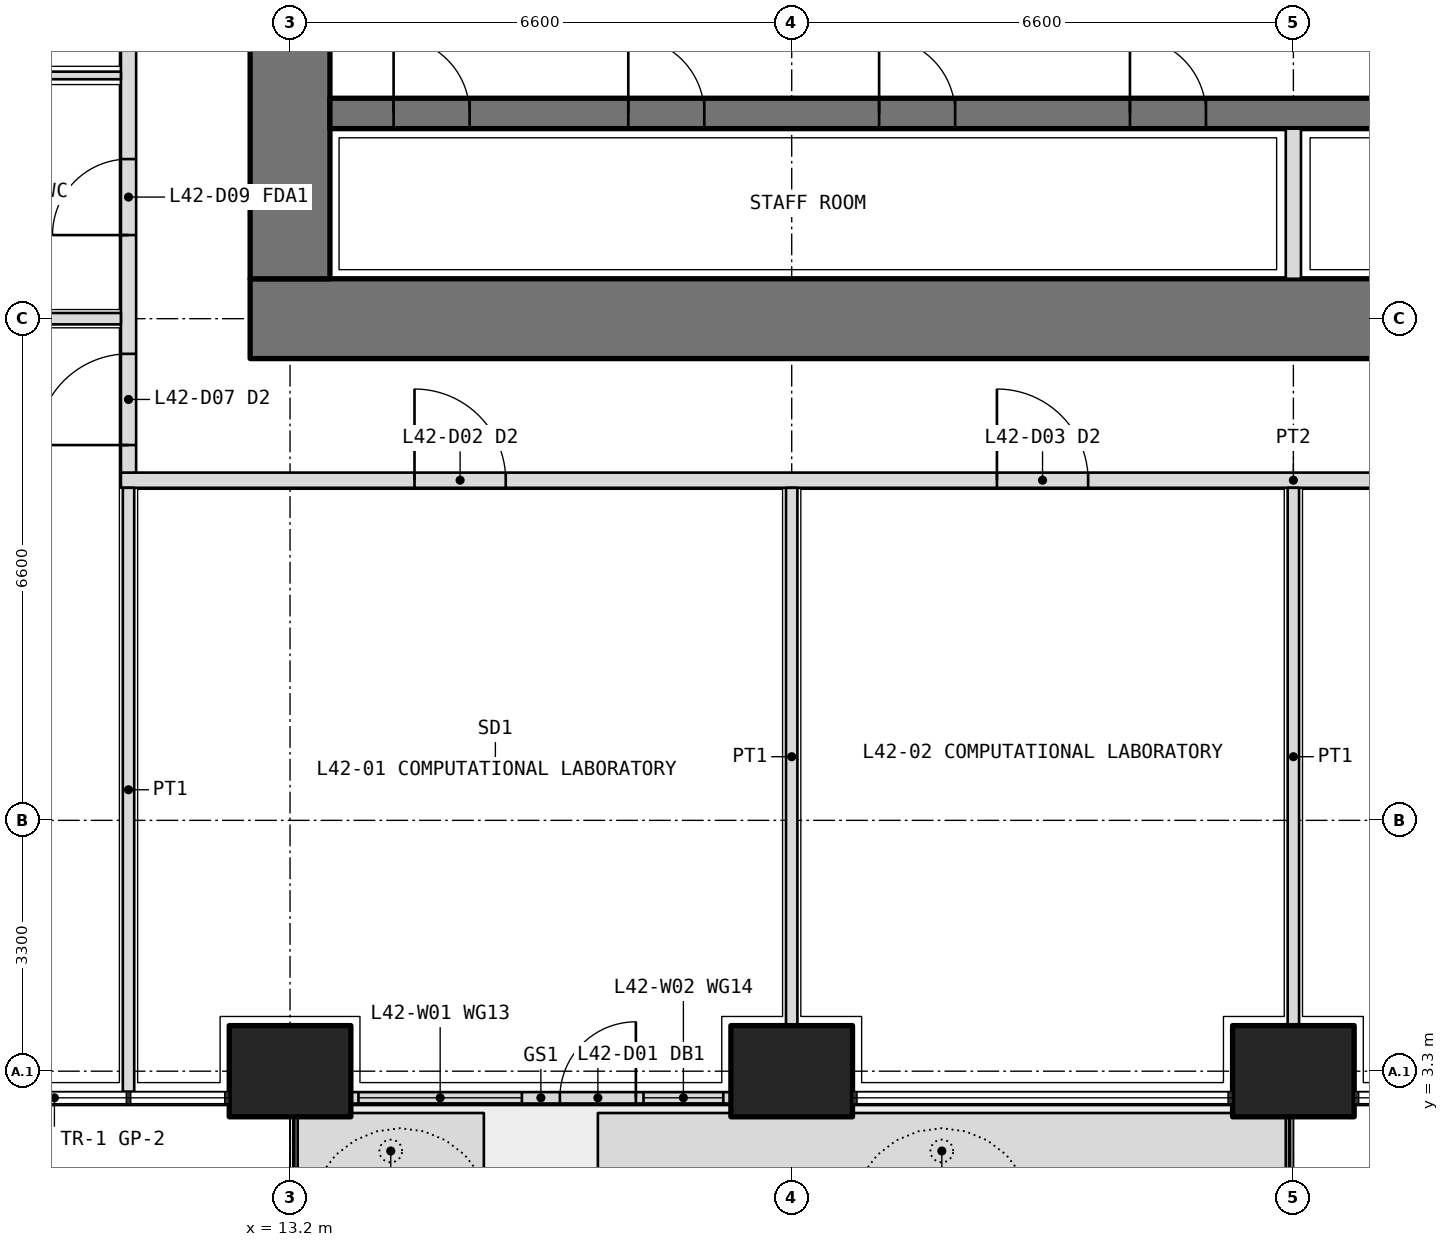
"""IFC4 building model, lengths in metres.
Left out: names, types, materials, properties, quantities, classifications, styles, units other than length and angle.
Written with IfcOpenShell. Run it as: python <this file> out.ifc"""

import sys

from ifc_helpers import new_model, si_unit, direction, frame, frame_2d, origin, origin_2d, place, context, subcontext, project, spatial, polyline, rectangle, outline, extrude, element, fill, save


model = new_model("IFC4")
c1 = context("Model", 3, precision=1e-05, world=origin(), true_north=direction((0.0, 1.0)))
c2 = subcontext(c1, "Body", "Model", "MODEL_VIEW")
j1 = project(units=[si_unit("LENGTHUNIT", "METRE"), si_unit("PLANEANGLEUNIT", "RADIAN")], contexts=[c1])
p1 = place(None, origin())
s1 = spatial("IfcSite", under=j1, at=p1, CompositionType="ELEMENT")
p2 = place(p1, origin())
s2 = spatial("IfcBuilding", under=s1, at=p2, CompositionType="ELEMENT")
p3 = place(p2, frame((0.0, 0.0, 185.1)))
s3 = spatial("IfcBuildingStorey", under=s2, at=p3, CompositionType="ELEMENT", Elevation=185.1)
for number, where, z_axis, x_axis in (
    (1, (13.2, 3.3, 0.0), (0.0, 0.0, 1.0), (1.0, 0.0, 0.0)),
    (2, (19.8, 3.3, 0.0), (0.0, 0.0, 1.0), (1.0, 0.0, 0.0)),
    (3, (26.4, 3.3, 0.0), (0.0, 0.0, 1.0), (1.0, 0.0, 0.0)),
):
    element("IfcColumn", number, at=place(p3, frame(where, z_axis=z_axis, x_axis=x_axis)), inside=s3, PredefinedType="COLUMN", context=c2, shape_type="SweptSolid", body=[
        extrude(rectangle(XDim=1.6, YDim=1.2, at=origin_2d()), origin(), (0.0, 0.0, 1.0), 4.2),
    ])
p4 = place(p3, origin())
e4 = element("IfcWall", 4, at=p4, inside=s3, PredefinedType="USERDEFINED", context=c2, shape_type="SweptSolid", body=[
    extrude(outline(polyline([(13.3, 1.75), (15.75, 1.75), (15.75, 2.75), (13.3, 2.75), (13.3, 1.75)]), holes=[polyline([(13.45, 1.9), (15.6, 1.9), (15.6, 2.6), (13.45, 2.6), (13.45, 1.9)])]), origin(), (0.0, 0.0, 1.0), 1.05),
])
p5 = place(p3, origin())
e5 = element("IfcWall", 5, at=p5, inside=s3, PredefinedType="USERDEFINED", context=c2, shape_type="SweptSolid", body=[
    extrude(outline(polyline([(17.25, 1.75), (26.3, 1.75), (26.3, 2.75), (17.25, 2.75), (17.25, 1.75)]), holes=[polyline([(17.4, 1.9), (26.15, 1.9), (26.15, 2.6), (17.4, 2.6), (17.4, 1.9)])]), origin(), (0.0, 0.0, 1.0), 1.05),
])
p6 = place(p3, frame((14.0, 2.95, 0.0), z_axis=(0.0, 0.0, 1.0), x_axis=(1.0, 0.0, 0.0)))
e6 = element("IfcWall", 6, at=p6, inside=s3, PredefinedType="SOLIDWALL", context=c2, shape_type="SweptSolid", body=[
    extrude(rectangle(XDim=5.0, YDim=0.15, at=frame_2d((2.5, 0.0))), origin(), (0.0, 0.0, 1.0), 2.7),
])
p7 = place(p6, frame((2.75, 0.0, 0.0)))
e7 = element("IfcOpeningElement", 7, at=p7, cuts=e6, PredefinedType="OPENING", context=c2, shape_type="SweptSolid", body=[
    extrude(rectangle(XDim=1.0, YDim=2.4, at=frame_2d((0.5, 1.2))), frame((0.0, 0.085, 0.0), z_axis=(0.0, -1.0, 0.0), x_axis=(1.0, 0.0, 0.0)), (0.0, 0.0, 1.0), 0.17),
])
p8 = place(p6, frame((0.1, 0.0, 0.1)))
e8 = element("IfcOpeningElement", 8, at=p8, cuts=e6, PredefinedType="OPENING", context=c2, shape_type="SweptSolid", body=[
    extrude(rectangle(XDim=2.15, YDim=2.3, at=frame_2d((1.075, 1.15))), frame((0.0, 0.085, 0.0), z_axis=(0.0, -1.0, 0.0), x_axis=(1.0, 0.0, 0.0)), (0.0, 0.0, 1.0), 0.17),
])
p9 = place(p6, frame((3.85, 0.0, 0.1)))
e9 = element("IfcOpeningElement", 9, at=p9, cuts=e6, PredefinedType="OPENING", context=c2, shape_type="SweptSolid", body=[
    extrude(rectangle(XDim=1.05, YDim=2.3, at=frame_2d((0.525, 1.15))), frame((0.0, 0.085, 0.0), z_axis=(0.0, -1.0, 0.0), x_axis=(1.0, 0.0, 0.0)), (0.0, 0.0, 1.0), 0.17),
])
p10 = place(p3, frame((12.675, 13.2, 0.0), z_axis=(0.0, 0.0, 1.0), x_axis=(1.0, 0.0, 0.0)))
e10 = element("IfcWall", 10, at=p10, inside=s3, PredefinedType="SHEAR", context=c2, shape_type="SweptSolid", body=[
    extrude(rectangle(XDim=27.45, YDim=1.05, at=frame_2d((13.725, 0.0))), origin(), (0.0, 0.0, 1.0), 4.2),
])
p11 = place(p3, frame((13.2, 32.475, 0.0), z_axis=(0.0, 0.0, 1.0), x_axis=(0.0, -1.0, 0.0)))
e11 = element("IfcWall", 11, at=p11, inside=s3, PredefinedType="SHEAR", context=c2, shape_type="SweptSolid", body=[
    extrude(rectangle(XDim=18.75, YDim=1.05, at=frame_2d((9.375, 0.0))), origin(), (0.0, 0.0, 1.0), 4.2),
])
p12 = place(p11, frame((14.125, 0.0, 0.0)))
e12 = element("IfcOpeningElement", 12, at=p12, cuts=e11, PredefinedType="OPENING", context=c2, shape_type="SweptSolid", body=[
    extrude(rectangle(XDim=1.6, YDim=2.1, at=frame_2d((0.8, 1.05))), frame((0.0, 0.535, 0.0), z_axis=(0.0, -1.0, 0.0), x_axis=(1.0, 0.0, 0.0)), (0.0, 0.0, 1.0), 1.07),
])
p13 = place(p11, frame((3.325, 0.0, 0.0)))
e13 = element("IfcOpeningElement", 13, at=p13, cuts=e11, PredefinedType="OPENING", context=c2, shape_type="SweptSolid", body=[
    extrude(rectangle(XDim=1.6, YDim=2.1, at=frame_2d((0.8, 1.05))), frame((0.0, 0.535, 0.0), z_axis=(0.0, -1.0, 0.0), x_axis=(1.0, 0.0, 0.0)), (0.0, 0.0, 1.0), 1.07),
])
p14 = place(p3, frame((13.725, 15.9, 0.0), z_axis=(0.0, 0.0, 1.0), x_axis=(1.0, 0.0, 0.0)))
e14 = element("IfcWall", 14, at=p14, inside=s3, PredefinedType="SHEAR", context=c2, shape_type="SweptSolid", body=[
    extrude(rectangle(XDim=25.35, YDim=0.4, at=frame_2d((12.675, 0.0))), origin(), (0.0, 0.0, 1.0), 4.2),
])
p15 = place(p14, frame((0.837, 0.0, 0.0)))
e15 = element("IfcOpeningElement", 15, at=p15, cuts=e14, PredefinedType="OPENING", context=c2, shape_type="SweptSolid", body=[
    extrude(rectangle(XDim=1.0, YDim=2.1, at=frame_2d((0.5, 1.05))), frame((0.0, 0.21, 0.0), z_axis=(0.0, -1.0, 0.0), x_axis=(1.0, 0.0, 0.0)), (0.0, 0.0, 1.0), 0.42),
])
p16 = place(p14, frame((3.925, 0.0, 0.0)))
e16 = element("IfcOpeningElement", 16, at=p16, cuts=e14, PredefinedType="OPENING", context=c2, shape_type="SweptSolid", body=[
    extrude(rectangle(XDim=1.0, YDim=2.1, at=frame_2d((0.5, 1.05))), frame((0.0, 0.21, 0.0), z_axis=(0.0, -1.0, 0.0), x_axis=(1.0, 0.0, 0.0)), (0.0, 0.0, 1.0), 0.42),
])
p17 = place(p14, frame((7.225, 0.0, 0.0)))
e17 = element("IfcOpeningElement", 17, at=p17, cuts=e14, PredefinedType="OPENING", context=c2, shape_type="SweptSolid", body=[
    extrude(rectangle(XDim=1.0, YDim=2.1, at=frame_2d((0.5, 1.05))), frame((0.0, 0.21, 0.0), z_axis=(0.0, -1.0, 0.0), x_axis=(1.0, 0.0, 0.0)), (0.0, 0.0, 1.0), 0.42),
])
p18 = place(p14, frame((10.525, 0.0, 0.0)))
e18 = element("IfcOpeningElement", 18, at=p18, cuts=e14, PredefinedType="OPENING", context=c2, shape_type="SweptSolid", body=[
    extrude(rectangle(XDim=1.0, YDim=2.1, at=frame_2d((0.5, 1.05))), frame((0.0, 0.21, 0.0), z_axis=(0.0, -1.0, 0.0), x_axis=(1.0, 0.0, 0.0)), (0.0, 0.0, 1.0), 0.42),
])
p19 = place(p14, frame((13.825, 0.0, 0.0)))
e19 = element("IfcOpeningElement", 19, at=p19, cuts=e14, PredefinedType="OPENING", context=c2, shape_type="SweptSolid", body=[
    extrude(rectangle(XDim=1.0, YDim=2.1, at=frame_2d((0.5, 1.05))), frame((0.0, 0.21, 0.0), z_axis=(0.0, -1.0, 0.0), x_axis=(1.0, 0.0, 0.0)), (0.0, 0.0, 1.0), 0.42),
])
p20 = place(p14, frame((17.125, 0.0, 0.0)))
e20 = element("IfcOpeningElement", 20, at=p20, cuts=e14, PredefinedType="OPENING", context=c2, shape_type="SweptSolid", body=[
    extrude(rectangle(XDim=1.0, YDim=2.1, at=frame_2d((0.5, 1.05))), frame((0.0, 0.21, 0.0), z_axis=(0.0, -1.0, 0.0), x_axis=(1.0, 0.0, 0.0)), (0.0, 0.0, 1.0), 0.42),
])
p21 = place(p14, frame((20.425, 0.0, 0.0)))
e21 = element("IfcOpeningElement", 21, at=p21, cuts=e14, PredefinedType="OPENING", context=c2, shape_type="SweptSolid", body=[
    extrude(rectangle(XDim=1.0, YDim=2.1, at=frame_2d((0.5, 1.05))), frame((0.0, 0.21, 0.0), z_axis=(0.0, -1.0, 0.0), x_axis=(1.0, 0.0, 0.0)), (0.0, 0.0, 1.0), 0.42),
])
p22 = place(p14, frame((23.512, 0.0, 0.0)))
e22 = element("IfcOpeningElement", 22, at=p22, cuts=e14, PredefinedType="OPENING", context=c2, shape_type="SweptSolid", body=[
    extrude(rectangle(XDim=1.0, YDim=2.1, at=frame_2d((0.5, 1.05))), frame((0.0, 0.21, 0.0), z_axis=(0.0, -1.0, 0.0), x_axis=(1.0, 0.0, 0.0)), (0.0, 0.0, 1.0), 0.42),
])
p23 = place(p3, frame((26.4, 13.725, 0.0), z_axis=(0.0, 0.0, 1.0), x_axis=(0.0, 1.0, 0.0)))
e23 = element("IfcWall", 23, at=p23, inside=s3, PredefinedType="PARTITIONING", context=c2, shape_type="SweptSolid", body=[
    extrude(rectangle(XDim=1.975, YDim=0.2, at=frame_2d((0.987, 0.0))), origin(), (0.0, 0.0, 1.0), 4.2),
])
p24 = place(p3, frame((10.975, 11.075, 0.0), z_axis=(0.0, 0.0, 1.0), x_axis=(1.0, 0.0, 0.0)))
e24 = element("IfcWall", 24, at=p24, inside=s3, PredefinedType="PARTITIONING", context=c2, shape_type="SweptSolid", body=[
    extrude(rectangle(XDim=30.85, YDim=0.2, at=frame_2d((15.425, 0.0))), origin(), (0.0, 0.0, 1.0), 2.85),
])
p25 = place(p24, frame((3.863, 0.0, 0.0)))
e25 = element("IfcOpeningElement", 25, at=p25, cuts=e24, PredefinedType="OPENING", context=c2, shape_type="SweptSolid", body=[
    extrude(rectangle(XDim=1.2, YDim=2.1, at=frame_2d((0.6, 1.05))), frame((0.0, 0.11, 0.0), z_axis=(0.0, -1.0, 0.0), x_axis=(1.0, 0.0, 0.0)), (0.0, 0.0, 1.0), 0.22),
])
p26 = place(p24, frame((11.525, 0.0, 0.0)))
e26 = element("IfcOpeningElement", 26, at=p26, cuts=e24, PredefinedType="OPENING", context=c2, shape_type="SweptSolid", body=[
    extrude(rectangle(XDim=1.2, YDim=2.1, at=frame_2d((0.6, 1.05))), frame((0.0, 0.11, 0.0), z_axis=(0.0, -1.0, 0.0), x_axis=(1.0, 0.0, 0.0)), (0.0, 0.0, 1.0), 0.22),
])
p27 = place(p24, frame((18.125, 0.0, 0.0)))
e27 = element("IfcOpeningElement", 27, at=p27, cuts=e24, PredefinedType="OPENING", context=c2, shape_type="SweptSolid", body=[
    extrude(rectangle(XDim=1.2, YDim=2.1, at=frame_2d((0.6, 1.05))), frame((0.0, 0.11, 0.0), z_axis=(0.0, -1.0, 0.0), x_axis=(1.0, 0.0, 0.0)), (0.0, 0.0, 1.0), 0.22),
])
p28 = place(p24, frame((23.075, 0.0, 0.0)))
e28 = element("IfcOpeningElement", 28, at=p28, cuts=e24, PredefinedType="OPENING", context=c2, shape_type="SweptSolid", body=[
    extrude(rectangle(XDim=1.2, YDim=2.1, at=frame_2d((0.6, 1.05))), frame((0.0, 0.11, 0.0), z_axis=(0.0, -1.0, 0.0), x_axis=(1.0, 0.0, 0.0)), (0.0, 0.0, 1.0), 0.22),
])
p29 = place(p24, frame((27.438, 0.0, 0.0)))
e29 = element("IfcOpeningElement", 29, at=p29, cuts=e24, PredefinedType="OPENING", context=c2, shape_type="SweptSolid", body=[
    extrude(rectangle(XDim=1.2, YDim=2.1, at=frame_2d((0.6, 1.05))), frame((0.0, 0.11, 0.0), z_axis=(0.0, -1.0, 0.0), x_axis=(1.0, 0.0, 0.0)), (0.0, 0.0, 1.0), 0.22),
])
p30 = place(p3, frame((11.075, 11.175, 0.0), z_axis=(0.0, 0.0, 1.0), x_axis=(0.0, 1.0, 0.0)))
e30 = element("IfcWall", 30, at=p30, inside=s3, PredefinedType="PARTITIONING", context=c2, shape_type="SweptSolid", body=[
    extrude(rectangle(XDim=15.225, YDim=0.2, at=frame_2d((7.612, 0.0))), origin(), (0.0, 0.0, 1.0), 2.85),
])
p31 = place(p30, frame((0.363, 0.0, 0.0)))
e31 = element("IfcOpeningElement", 31, at=p31, cuts=e30, PredefinedType="OPENING", context=c2, shape_type="SweptSolid", body=[
    extrude(rectangle(XDim=1.2, YDim=2.1, at=frame_2d((0.6, 1.05))), frame((0.0, 0.11, 0.0), z_axis=(0.0, -1.0, 0.0), x_axis=(1.0, 0.0, 0.0)), (0.0, 0.0, 1.0), 0.22),
])
p32 = place(p30, frame((3.125, 0.0, 0.0)))
e32 = element("IfcOpeningElement", 32, at=p32, cuts=e30, PredefinedType="OPENING", context=c2, shape_type="SweptSolid", body=[
    extrude(rectangle(XDim=1.0, YDim=2.1, at=frame_2d((0.5, 1.05))), frame((0.0, 0.11, 0.0), z_axis=(0.0, -1.0, 0.0), x_axis=(1.0, 0.0, 0.0)), (0.0, 0.0, 1.0), 0.22),
])
p33 = place(p30, frame((6.475, 0.0, 0.0)))
e33 = element("IfcOpeningElement", 33, at=p33, cuts=e30, PredefinedType="OPENING", context=c2, shape_type="SweptSolid", body=[
    extrude(rectangle(XDim=0.9, YDim=2.1, at=frame_2d((0.45, 1.05))), frame((0.0, 0.11, 0.0), z_axis=(0.0, -1.0, 0.0), x_axis=(1.0, 0.0, 0.0)), (0.0, 0.0, 1.0), 0.22),
])
p34 = place(p30, frame((9.675, 0.0, 0.0)))
e34 = element("IfcOpeningElement", 34, at=p34, cuts=e30, PredefinedType="OPENING", context=c2, shape_type="SweptSolid", body=[
    extrude(rectangle(XDim=0.9, YDim=2.1, at=frame_2d((0.45, 1.05))), frame((0.0, 0.11, 0.0), z_axis=(0.0, -1.0, 0.0), x_axis=(1.0, 0.0, 0.0)), (0.0, 0.0, 1.0), 0.22),
])
p35 = place(p30, frame((12.925, 0.0, 0.0)))
e35 = element("IfcOpeningElement", 35, at=p35, cuts=e30, PredefinedType="OPENING", context=c2, shape_type="SweptSolid", body=[
    extrude(rectangle(XDim=1.0, YDim=2.1, at=frame_2d((0.5, 1.05))), frame((0.0, 0.11, 0.0), z_axis=(0.0, -1.0, 0.0), x_axis=(1.0, 0.0, 0.0)), (0.0, 0.0, 1.0), 0.22),
])
p36 = place(p3, frame((11.075, 3.03, 0.0), z_axis=(0.0, 0.0, 1.0), x_axis=(0.0, 1.0, 0.0)))
e36 = element("IfcWall", 36, at=p36, inside=s3, PredefinedType="PARTITIONING", context=c2, shape_type="SweptSolid", body=[
    extrude(rectangle(XDim=7.945, YDim=0.15, at=frame_2d((3.973, 0.0))), origin(), (0.0, 0.0, 1.0), 2.7),
])
for number, where, z_axis, x_axis in (
    (37, (19.8, 3.9, 0.0), (0.0, 0.0, 1.0), (0.0, 1.0, 0.0)),
    (38, (26.4, 3.9, 0.0), (0.0, 0.0, 1.0), (0.0, 1.0, 0.0)),
):
    element("IfcWall", number, at=place(p3, frame(where, z_axis=z_axis, x_axis=x_axis)), inside=s3, PredefinedType="PARTITIONING", context=c2, shape_type="SweptSolid", body=[
        extrude(rectangle(XDim=7.075, YDim=0.15, at=frame_2d((3.538, 0.0))), origin(), (0.0, 0.0, 1.0), 2.85),
    ])
p37 = place(p3, frame((3.03, 16.4, 0.0), z_axis=(0.0, 0.0, 1.0), x_axis=(1.0, 0.0, 0.0)))
e39 = element("IfcWall", 39, at=p37, inside=s3, PredefinedType="PARTITIONING", context=c2, shape_type="SweptSolid", body=[
    extrude(rectangle(XDim=7.945, YDim=0.1, at=frame_2d((3.973, 0.0))), origin(), (0.0, 0.0, 1.0), 2.7),
])
p38 = place(p3, frame((7.2, 13.2, 0.0), z_axis=(0.0, 0.0, 1.0), x_axis=(1.0, 0.0, 0.0)))
e40 = element("IfcWall", 40, at=p38, inside=s3, PredefinedType="PARTITIONING", context=c2, shape_type="SweptSolid", body=[
    extrude(rectangle(XDim=3.775, YDim=0.15, at=frame_2d((1.888, 0.0))), origin(), (0.0, 0.0, 1.0), 2.85),
])
p39 = place(p7, origin())
e41 = element("IfcDoor", 41, at=p39, inside=s3, OperationType="SINGLE_SWING_RIGHT", PredefinedType="DOOR", context=c2, shape_type="SweptSolid", body=[
    extrude(rectangle(XDim=1.0, YDim=2.4, at=frame_2d((0.5, 1.2))), frame((0.0, 0.025, 0.0), z_axis=(0.0, -1.0, 0.0), x_axis=(1.0, 0.0, 0.0)), (0.0, 0.0, 1.0), 0.05),
])
fill(e7, e41)
p40 = place(p8, origin())
e42 = element("IfcWindow", 42, at=p40, inside=s3, PartitioningType="SINGLE_PANEL", PredefinedType="WINDOW", context=c2, shape_type="SweptSolid", body=[
    extrude(rectangle(XDim=2.15, YDim=2.3, at=frame_2d((1.075, 1.15))), frame((0.0, 0.03, 0.0), z_axis=(0.0, -1.0, 0.0), x_axis=(1.0, 0.0, 0.0)), (0.0, 0.0, 1.0), 0.06),
])
fill(e8, e42)
p41 = place(p9, origin())
e43 = element("IfcWindow", 43, at=p41, inside=s3, PartitioningType="SINGLE_PANEL", PredefinedType="WINDOW", context=c2, shape_type="SweptSolid", body=[
    extrude(rectangle(XDim=1.05, YDim=2.3, at=frame_2d((0.525, 1.15))), frame((0.0, 0.03, 0.0), z_axis=(0.0, -1.0, 0.0), x_axis=(1.0, 0.0, 0.0)), (0.0, 0.0, 1.0), 0.06),
])
fill(e9, e43)
p42 = place(p25, origin())
e44 = element("IfcDoor", 44, at=p42, inside=s3, OperationType="DOUBLE_DOOR_SINGLE_SWING", PredefinedType="DOOR", context=c2, shape_type="SweptSolid", body=[
    extrude(rectangle(XDim=1.2, YDim=2.1, at=frame_2d((0.6, 1.05))), frame((0.0, 0.025, 0.0), z_axis=(0.0, -1.0, 0.0), x_axis=(1.0, 0.0, 0.0)), (0.0, 0.0, 1.0), 0.05),
])
fill(e25, e44)
p43 = place(p26, origin())
e45 = element("IfcDoor", 45, at=p43, inside=s3, OperationType="DOUBLE_DOOR_SINGLE_SWING", PredefinedType="DOOR", context=c2, shape_type="SweptSolid", body=[
    extrude(rectangle(XDim=1.2, YDim=2.1, at=frame_2d((0.6, 1.05))), frame((0.0, 0.025, 0.0), z_axis=(0.0, -1.0, 0.0), x_axis=(1.0, 0.0, 0.0)), (0.0, 0.0, 1.0), 0.05),
])
fill(e26, e45)
p44 = place(p31, origin())
e46 = element("IfcDoor", 46, at=p44, inside=s3, OperationType="DOUBLE_DOOR_SINGLE_SWING", PredefinedType="DOOR", context=c2, shape_type="SweptSolid", body=[
    extrude(rectangle(XDim=1.2, YDim=2.1, at=frame_2d((0.6, 1.05))), frame((0.0, 0.025, 0.0), z_axis=(0.0, -1.0, 0.0), x_axis=(1.0, 0.0, 0.0)), (0.0, 0.0, 1.0), 0.05),
])
fill(e31, e46)
p45 = place(p32, origin())
e47 = element("IfcDoor", 47, at=p45, inside=s3, OperationType="SINGLE_SWING_LEFT", PredefinedType="DOOR", context=c2, shape_type="SweptSolid", body=[
    extrude(rectangle(XDim=1.0, YDim=2.1, at=frame_2d((0.5, 1.05))), frame((0.0, 0.025, 0.0), z_axis=(0.0, -1.0, 0.0), x_axis=(1.0, 0.0, 0.0)), (0.0, 0.0, 1.0), 0.05),
])
fill(e32, e47)
p46 = place(p15, origin())
e48 = element("IfcDoor", 48, at=p46, inside=s3, OperationType="SINGLE_SWING_LEFT", PredefinedType="DOOR", context=c2, shape_type="SweptSolid", body=[
    extrude(rectangle(XDim=1.0, YDim=2.1, at=frame_2d((0.5, 1.05))), frame((0.0, 0.025, 0.0), z_axis=(0.0, -1.0, 0.0), x_axis=(1.0, 0.0, 0.0)), (0.0, 0.0, 1.0), 0.05),
])
fill(e15, e48)
p47 = place(p16, origin())
e49 = element("IfcDoor", 49, at=p47, inside=s3, OperationType="SINGLE_SWING_LEFT", PredefinedType="DOOR", context=c2, shape_type="SweptSolid", body=[
    extrude(rectangle(XDim=1.0, YDim=2.1, at=frame_2d((0.5, 1.05))), frame((0.0, 0.025, 0.0), z_axis=(0.0, -1.0, 0.0), x_axis=(1.0, 0.0, 0.0)), (0.0, 0.0, 1.0), 0.05),
])
fill(e16, e49)
p48 = place(p17, origin())
e50 = element("IfcDoor", 50, at=p48, inside=s3, OperationType="SINGLE_SWING_LEFT", PredefinedType="DOOR", context=c2, shape_type="SweptSolid", body=[
    extrude(rectangle(XDim=1.0, YDim=2.1, at=frame_2d((0.5, 1.05))), frame((0.0, 0.025, 0.0), z_axis=(0.0, -1.0, 0.0), x_axis=(1.0, 0.0, 0.0)), (0.0, 0.0, 1.0), 0.05),
])
fill(e17, e50)
p49 = place(p18, origin())
e51 = element("IfcDoor", 51, at=p49, inside=s3, OperationType="SINGLE_SWING_LEFT", PredefinedType="DOOR", context=c2, shape_type="SweptSolid", body=[
    extrude(rectangle(XDim=1.0, YDim=2.1, at=frame_2d((0.5, 1.05))), frame((0.0, 0.025, 0.0), z_axis=(0.0, -1.0, 0.0), x_axis=(1.0, 0.0, 0.0)), (0.0, 0.0, 1.0), 0.05),
])
fill(e18, e51)
save(model, sys.argv[1])
